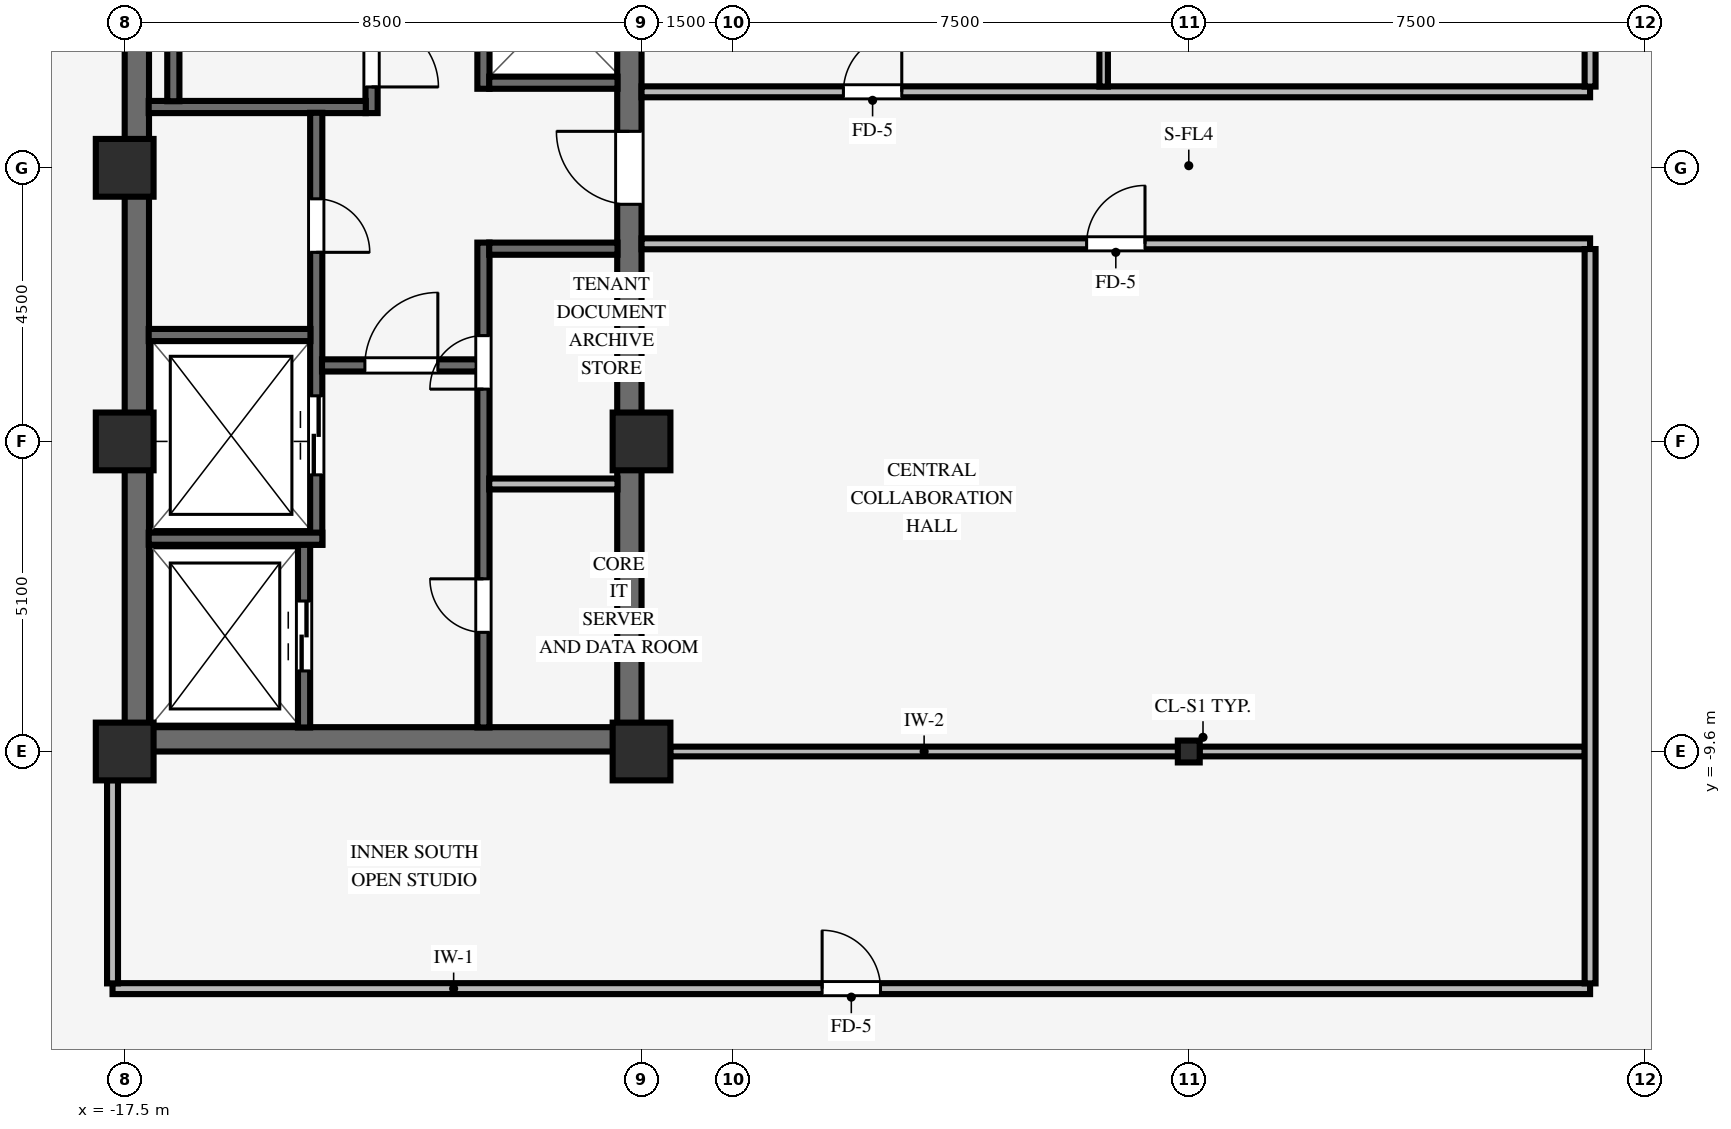
"""IFC4 building model, lengths in metres.
Left out: names, types, materials, properties, quantities, classifications, styles, units other than length and angle.
Written with IfcOpenShell. Run it as: python <this file> out.ifc"""

import sys

from ifc_helpers import new_model, si_unit, direction, frame, frame_2d, origin, origin_2d, place, context, subcontext, project, spatial, rectangle, i_section, extrude, source, transform, mapped, element, fill, save


model = new_model("IFC4")
c1 = context("Model", 3, precision=1e-05, world=origin(), true_north=direction((0.0, 1.0)))
c2 = subcontext(c1, "Body", "Model", "MODEL_VIEW")
j1 = project(units=[si_unit("LENGTHUNIT", "METRE"), si_unit("PLANEANGLEUNIT", "RADIAN")], contexts=[c1])
p1 = place(None, origin())
s1 = spatial("IfcSite", under=j1, at=p1, CompositionType="ELEMENT")
p2 = place(p1, origin())
s2 = spatial("IfcBuilding", under=s1, at=p2, CompositionType="ELEMENT")
p3 = place(p2, frame((0.0, 0.0, 164.0)))
s3 = spatial("IfcBuildingStorey", under=s2, at=p3, CompositionType="ELEMENT", Elevation=164.0)
p4 = place(p3, frame((-17.5, -9.4, 0.0), z_axis=(0.0, 0.0, 1.0), x_axis=(1.0, 0.0, 0.0)))
e1 = element("IfcWall", 1, at=p4, inside=s3, PredefinedType="SHEAR", context=c2, shape_type="SweptSolid", body=[
    extrude(rectangle(XDim=8.5, YDim=0.4, at=frame_2d((4.25, 0.0))), origin(), (0.0, 0.0, 1.0), 3.25),
])
p5 = place(p3, frame((-17.3, -9.205, 0.0), z_axis=(0.0, 0.0, 1.0), x_axis=(0.0, 1.0, 0.0)))
e2 = element("IfcWall", 2, at=p5, inside=s3, PredefinedType="SHEAR", context=c2, shape_type="SweptSolid", body=[
    extrude(rectangle(XDim=18.41, YDim=0.4, at=frame_2d((9.205, 0.0))), origin(), (0.0, 0.0, 1.0), 3.25),
])
p6 = place(p3, frame((-9.2, -9.205, 0.0), z_axis=(0.0, 0.0, 1.0), x_axis=(0.0, 1.0, 0.0)))
e3 = element("IfcWall", 3, at=p6, inside=s3, PredefinedType="SHEAR", context=c2, shape_type="SweptSolid", body=[
    extrude(rectangle(XDim=18.41, YDim=0.4, at=frame_2d((9.205, 0.0))), origin(), (0.0, 0.0, 1.0), 3.25),
])
p7 = place(p6, frame((8.605, 0.0, 0.0)))
e4 = element("IfcOpeningElement", 4, at=p7, cuts=e3, PredefinedType="OPENING", context=c2, shape_type="SweptSolid", body=[
    extrude(rectangle(XDim=1.2, YDim=2.15, at=frame_2d((0.6, 1.075))), frame((0.0, 0.21, 0.0), z_axis=(0.0, -1.0, 0.0), x_axis=(1.0, 0.0, 0.0)), (0.0, 0.0, 1.0), 0.42),
])
for number, where, z_axis, x_axis in (
    (5, (-17.5, -9.6, 0.0), (0.0, 0.0, 1.0), (1.0, 0.0, 0.0)),
    (6, (-17.5, -4.5, 0.0), (0.0, 0.0, 1.0), (1.0, 0.0, 0.0)),
    (7, (-9.0, -9.6, 0.0), (0.0, 0.0, 1.0), (1.0, 0.0, 0.0)),
    (8, (-9.0, -4.5, 0.0), (0.0, 0.0, 1.0), (1.0, 0.0, 0.0)),
    (9, (-17.5, 0.0, 0.0), (0.0, 0.0, 1.0), (1.0, 0.0, 0.0)),
):
    element("IfcColumn", number, at=place(p3, frame(where, z_axis=z_axis, x_axis=x_axis)), inside=s3, PredefinedType="COLUMN", context=c2, shape_type="SweptSolid", body=[
        extrude(rectangle(XDim=0.95, YDim=0.95, at=origin_2d()), origin(), (0.0, 0.0, 1.0), 3.25),
    ])
p8 = place(p3, frame((0.0, -9.6, 0.0), z_axis=(0.0, 0.0, 1.0), x_axis=(1.0, 0.0, 0.0)))
e10 = element("IfcColumn", 10, at=p8, inside=s3, PredefinedType="COLUMN", context=c2, shape_type="SweptSolid", body=[
    extrude(i_section(OverallWidth=0.36, OverallDepth=0.36, WebThickness=0.021, FlangeThickness=0.021, FilletRadius=0.018, at=origin_2d()), origin(), (0.0, 0.0, 1.0), 3.25),
])
p9 = place(p3, frame((-13.44, 0.9, 0.0), z_axis=(0.0, 0.0, 1.0), x_axis=(0.0, 1.0, 0.0)))
e11 = element("IfcWall", 11, at=p9, inside=s3, PredefinedType="SHEAR", context=c2, shape_type="SweptSolid", body=[
    extrude(rectangle(XDim=8.305, YDim=0.2, at=frame_2d((4.153, 0.0))), origin(), (0.0, 0.0, 1.0), 3.25),
])
p10 = place(p9, frame((1.53, 0.0, 0.0), z_axis=(0.0, 0.0, 1.0), x_axis=(-1.0, 0.0, 0.0)))
e12 = element("IfcOpeningElement", 12, at=p10, cuts=e11, PredefinedType="OPENING", context=c2, shape_type="SweptSolid", body=[
    extrude(rectangle(XDim=1.1, YDim=2.15, at=frame_2d((0.55, 1.075))), frame((0.0, 0.11, 0.0), z_axis=(0.0, -1.0, 0.0), x_axis=(1.0, 0.0, 0.0)), (0.0, 0.0, 1.0), 0.22),
])
p11 = place(p3, frame((-17.105, 1.0, 0.0), z_axis=(0.0, 0.0, 1.0), x_axis=(1.0, 0.0, 0.0)))
e13 = element("IfcWall", 13, at=p11, inside=s3, PredefinedType="SHEAR", context=c2, shape_type="SweptSolid", body=[
    extrude(rectangle(XDim=3.57, YDim=0.2, at=frame_2d((1.785, 0.0))), origin(), (0.0, 0.0, 1.0), 3.25),
])
p12 = place(p3, frame((-16.7, 1.095, 0.0), z_axis=(0.0, 0.0, 1.0), x_axis=(0.0, 1.0, 0.0)))
e14 = element("IfcWall", 14, at=p12, inside=s3, PredefinedType="SHEAR", context=c2, shape_type="SweptSolid", body=[
    extrude(rectangle(XDim=8.11, YDim=0.2, at=frame_2d((4.055, 0.0))), origin(), (0.0, 0.0, 1.0), 3.25),
])
p13 = place(p3, frame((-14.55, -9.205, 0.0), z_axis=(0.0, 0.0, 1.0), x_axis=(0.0, 1.0, 0.0)))
e15 = element("IfcWall", 15, at=p13, inside=s3, PredefinedType="SHEAR", context=c2, shape_type="SweptSolid", body=[
    extrude(rectangle(XDim=3.01, YDim=0.2, at=frame_2d((1.505, 0.0))), origin(), (0.0, 0.0, 1.0), 3.25),
])
p14 = place(p13, frame((0.93, 0.0, 0.0)))
e16 = element("IfcOpeningElement", 16, at=p14, cuts=e15, PredefinedType="OPENING", context=c2, shape_type="SweptSolid", body=[
    extrude(rectangle(XDim=1.15, YDim=2.15, at=frame_2d((0.575, 1.075))), frame((0.0, 0.11, 0.0), z_axis=(0.0, -1.0, 0.0), x_axis=(1.0, 0.0, 0.0)), (0.0, 0.0, 1.0), 0.22),
])
p15 = place(p3, frame((-14.35, -6.2, 0.0), z_axis=(0.0, 0.0, 1.0), x_axis=(0.0, 1.0, 0.0)))
e17 = element("IfcWall", 17, at=p15, inside=s3, PredefinedType="SHEAR", context=c2, shape_type="SweptSolid", body=[
    extrude(rectangle(XDim=7.105, YDim=0.2, at=frame_2d((3.552, 0.0))), origin(), (0.0, 0.0, 1.0), 3.25),
])
p16 = place(p15, frame((5.69, 0.0, 0.0), z_axis=(0.0, 0.0, 1.0), x_axis=(-1.0, 0.0, 0.0)))
e18 = element("IfcOpeningElement", 18, at=p16, cuts=e17, PredefinedType="OPENING", context=c2, shape_type="SweptSolid", body=[
    extrude(rectangle(XDim=0.88, YDim=2.1, at=frame_2d((0.44, 1.05))), frame((0.0, 0.11, 0.0), z_axis=(0.0, -1.0, 0.0), x_axis=(1.0, 0.0, 0.0)), (0.0, 0.0, 1.0), 0.22),
])
p17 = place(p15, frame((1.15, 0.0, 0.0)))
e19 = element("IfcOpeningElement", 19, at=p17, cuts=e17, PredefinedType="OPENING", context=c2, shape_type="SweptSolid", body=[
    extrude(rectangle(XDim=1.3, YDim=2.2, at=frame_2d((0.65, 1.1))), frame((0.0, 0.11, 0.0), z_axis=(0.0, -1.0, 0.0), x_axis=(1.0, 0.0, 0.0)), (0.0, 0.0, 1.0), 0.22),
])
p18 = place(p3, frame((-17.105, -6.1, 0.0), z_axis=(0.0, 0.0, 1.0), x_axis=(1.0, 0.0, 0.0)))
e20 = element("IfcWall", 20, at=p18, inside=s3, PredefinedType="SHEAR", context=c2, shape_type="SweptSolid", body=[
    extrude(rectangle(XDim=2.855, YDim=0.2, at=frame_2d((1.427, 0.0))), origin(), (0.0, 0.0, 1.0), 3.25),
])
p19 = place(p3, frame((-17.105, -2.75, 0.0), z_axis=(0.0, 0.0, 1.0), x_axis=(1.0, 0.0, 0.0)))
e21 = element("IfcWall", 21, at=p19, inside=s3, PredefinedType="SHEAR", context=c2, shape_type="SweptSolid", body=[
    extrude(rectangle(XDim=2.66, YDim=0.2, at=frame_2d((1.33, 0.0))), origin(), (0.0, 0.0, 1.0), 3.25),
])
p20 = place(p3, frame((-11.6, -9.205, 0.0), z_axis=(0.0, 0.0, 1.0), x_axis=(0.0, 1.0, 0.0)))
e22 = element("IfcWall", 22, at=p20, inside=s3, PredefinedType="SHEAR", context=c2, shape_type="SweptSolid", body=[
    extrude(rectangle(XDim=7.975, YDim=0.2, at=frame_2d((3.988, 0.0))), origin(), (0.0, 0.0, 1.0), 3.25),
])
p21 = place(p20, frame((1.565, 0.0, 0.0)))
e23 = element("IfcOpeningElement", 23, at=p21, cuts=e22, PredefinedType="OPENING", context=c2, shape_type="SweptSolid", body=[
    extrude(rectangle(XDim=0.88, YDim=2.1, at=frame_2d((0.44, 1.05))), frame((0.0, 0.11, 0.0), z_axis=(0.0, -1.0, 0.0), x_axis=(1.0, 0.0, 0.0)), (0.0, 0.0, 1.0), 0.22),
])
p22 = place(p20, frame((5.565, 0.0, 0.0)))
e24 = element("IfcOpeningElement", 24, at=p22, cuts=e22, PredefinedType="OPENING", context=c2, shape_type="SweptSolid", body=[
    extrude(rectangle(XDim=0.88, YDim=2.1, at=frame_2d((0.44, 1.05))), frame((0.0, 0.11, 0.0), z_axis=(0.0, -1.0, 0.0), x_axis=(1.0, 0.0, 0.0)), (0.0, 0.0, 1.0), 0.22),
])
p23 = place(p3, frame((-14.255, -3.25, 0.0), z_axis=(0.0, 0.0, 1.0), x_axis=(1.0, 0.0, 0.0)))
e25 = element("IfcWall", 25, at=p23, inside=s3, PredefinedType="SHEAR", context=c2, shape_type="SweptSolid", body=[
    extrude(rectangle(XDim=2.56, YDim=0.2, at=frame_2d((1.28, 0.0))), origin(), (0.0, 0.0, 1.0), 3.25),
])
p24 = place(p23, frame((0.705, 0.0, 0.0)))
e26 = element("IfcOpeningElement", 26, at=p24, cuts=e25, PredefinedType="OPENING", context=c2, shape_type="SweptSolid", body=[
    extrude(rectangle(XDim=1.2, YDim=2.15, at=frame_2d((0.6, 1.075))), frame((0.0, 0.11, 0.0), z_axis=(0.0, -1.0, 0.0), x_axis=(1.0, 0.0, 0.0)), (0.0, 0.0, 1.0), 0.22),
])
p25 = place(p3, frame((-11.505, -1.33, 0.0), z_axis=(0.0, 0.0, 1.0), x_axis=(1.0, 0.0, 0.0)))
e27 = element("IfcWall", 27, at=p25, inside=s3, PredefinedType="SHEAR", context=c2, shape_type="SweptSolid", body=[
    extrude(rectangle(XDim=2.11, YDim=0.2, at=frame_2d((1.055, 0.0))), origin(), (0.0, 0.0, 1.0), 3.25),
])
p26 = place(p3, frame((-11.505, -5.2, 0.0), z_axis=(0.0, 0.0, 1.0), x_axis=(1.0, 0.0, 0.0)))
e28 = element("IfcWall", 28, at=p26, inside=s3, PredefinedType="PARTITIONING", context=c2, shape_type="SweptSolid", body=[
    extrude(rectangle(XDim=2.11, YDim=0.18, at=frame_2d((1.055, 0.0))), origin(), (0.0, 0.0, 1.0), 3.24),
])
p27 = place(p3, frame((-11.6, 1.3, 0.0), z_axis=(0.0, 0.0, 1.0), x_axis=(0.0, 1.0, 0.0)))
e29 = element("IfcWall", 29, at=p27, inside=s3, PredefinedType="SHEAR", context=c2, shape_type="SweptSolid", body=[
    extrude(rectangle(XDim=7.905, YDim=0.2, at=frame_2d((3.953, 0.0))), origin(), (0.0, 0.0, 1.0), 3.25),
])
p28 = place(p3, frame((-11.505, 1.4, 0.0), z_axis=(0.0, 0.0, 1.0), x_axis=(1.0, 0.0, 0.0)))
e30 = element("IfcWall", 30, at=p28, inside=s3, PredefinedType="SHEAR", context=c2, shape_type="SweptSolid", body=[
    extrude(rectangle(XDim=2.11, YDim=0.2, at=frame_2d((1.055, 0.0))), origin(), (0.0, 0.0, 1.0), 3.25),
])
p29 = place(p3, frame((-17.7, -13.5, 0.0), z_axis=(0.0, 0.0, 1.0), x_axis=(1.0, 0.0, 0.0)))
e31 = element("IfcWall", 31, at=p29, inside=s3, PredefinedType="PARTITIONING", context=c2, shape_type="SweptSolid", body=[
    extrude(rectangle(XDim=24.3, YDim=0.18, at=frame_2d((12.15, 0.0))), origin(), (0.0, 0.0, 1.0), 2.888),
])
p30 = place(p29, frame((11.67, 0.0, 0.0)))
e32 = element("IfcOpeningElement", 32, at=p30, cuts=e31, PredefinedType="OPENING", context=c2, shape_type="SweptSolid", body=[
    extrude(rectangle(XDim=0.96, YDim=2.1, at=frame_2d((0.48, 1.05))), frame((0.0, 0.1, 0.0), z_axis=(0.0, -1.0, 0.0), x_axis=(1.0, 0.0, 0.0)), (0.0, 0.0, 1.0), 0.2),
])
p31 = place(p3, frame((-8.529, -9.6, 0.0), z_axis=(0.0, 0.0, 1.0), x_axis=(1.0, 0.0, 0.0)))
e33 = element("IfcWall", 33, at=p31, inside=s3, PredefinedType="PARTITIONING", context=c2, shape_type="SweptSolid", body=[
    extrude(rectangle(XDim=8.353, YDim=0.16, at=frame_2d((4.177, 0.0))), origin(), (0.0, 0.0, 1.0), 2.285),
])
p32 = place(p3, frame((0.176, -9.6, 0.0), z_axis=(0.0, 0.0, 1.0), x_axis=(1.0, 0.0, 0.0)))
e34 = element("IfcWall", 34, at=p32, inside=s3, PredefinedType="PARTITIONING", context=c2, shape_type="SweptSolid", body=[
    extrude(rectangle(XDim=6.338, YDim=0.16, at=frame_2d((3.169, 0.0))), origin(), (0.0, 0.0, 1.0), 2.285),
])
p33 = place(p3, frame((-9.0, -1.25, 0.0), z_axis=(0.0, 0.0, 1.0), x_axis=(1.0, 0.0, 0.0)))
e35 = element("IfcWall", 35, at=p33, inside=s3, PredefinedType="PARTITIONING", context=c2, shape_type="SweptSolid", body=[
    extrude(rectangle(XDim=15.6, YDim=0.18, at=frame_2d((7.8, 0.0))), origin(), (0.0, 0.0, 1.0), 3.24),
])
p34 = place(p33, frame((7.32, 0.0, 0.0)))
e36 = element("IfcOpeningElement", 36, at=p34, cuts=e35, PredefinedType="OPENING", context=c2, shape_type="SweptSolid", body=[
    extrude(rectangle(XDim=0.96, YDim=2.1, at=frame_2d((0.48, 1.05))), frame((0.0, 0.1, 0.0), z_axis=(0.0, -1.0, 0.0), x_axis=(1.0, 0.0, 0.0)), (0.0, 0.0, 1.0), 0.2),
])
p35 = place(p3, frame((-9.0, 1.25, 0.0), z_axis=(0.0, 0.0, 1.0), x_axis=(1.0, 0.0, 0.0)))
e37 = element("IfcWall", 37, at=p35, inside=s3, PredefinedType="PARTITIONING", context=c2, shape_type="SweptSolid", body=[
    extrude(rectangle(XDim=15.6, YDim=0.18, at=frame_2d((7.8, 0.0))), origin(), (0.0, 0.0, 1.0), 3.24),
])
p36 = place(p35, frame((3.32, 0.0, 0.0)))
e38 = element("IfcOpeningElement", 38, at=p36, cuts=e37, PredefinedType="OPENING", context=c2, shape_type="SweptSolid", body=[
    extrude(rectangle(XDim=0.96, YDim=2.1, at=frame_2d((0.48, 1.05))), frame((0.0, 0.1, 0.0), z_axis=(0.0, -1.0, 0.0), x_axis=(1.0, 0.0, 0.0)), (0.0, 0.0, 1.0), 0.2),
])
p37 = place(p3, frame((-17.7, -13.414, 0.0), z_axis=(0.0, 0.0, 1.0), x_axis=(0.0, 1.0, 0.0)))
e39 = element("IfcWall", 39, at=p37, inside=s3, PredefinedType="PARTITIONING", context=c2, shape_type="SweptSolid", body=[
    extrude(rectangle(XDim=3.343, YDim=0.18, at=frame_2d((1.671, 0.0))), origin(), (0.0, 0.0, 1.0), 2.696),
])
p38 = place(p3, frame((-1.4, 1.336, 0.0), z_axis=(0.0, 0.0, 1.0), x_axis=(0.0, 1.0, 0.0)))
e40 = element("IfcWall", 40, at=p38, inside=s3, PredefinedType="PARTITIONING", context=c2, shape_type="SweptSolid", body=[
    extrude(rectangle(XDim=8.188, YDim=0.14, at=frame_2d((4.094, 0.0))), origin(), (0.0, 0.0, 1.0), 3.24),
])
p39 = place(p3, frame((6.6, -13.414, 0.0), z_axis=(0.0, 0.0, 1.0), x_axis=(0.0, 1.0, 0.0)))
e41 = element("IfcWall", 41, at=p39, inside=s3, PredefinedType="PARTITIONING", context=c2, shape_type="SweptSolid", body=[
    extrude(rectangle(XDim=12.078, YDim=0.18, at=frame_2d((6.039, 0.0))), origin(), (0.0, 0.0, 1.0), 3.24),
])
p40 = place(p3, frame((6.6, 1.336, 0.0), z_axis=(0.0, 0.0, 1.0), x_axis=(0.0, 1.0, 0.0)))
e42 = element("IfcWall", 42, at=p40, inside=s3, PredefinedType="PARTITIONING", context=c2, shape_type="SweptSolid", body=[
    extrude(rectangle(XDim=12.078, YDim=0.18, at=frame_2d((6.039, 0.0))), origin(), (0.0, 0.0, 1.0), 3.24),
])
p41 = place(p40, frame((3.652, 0.0, 0.0)))
e43 = element("IfcOpeningElement", 43, at=p41, cuts=e42, PredefinedType="OPENING", context=c2, shape_type="SweptSolid", body=[
    extrude(rectangle(XDim=0.96, YDim=2.1, at=frame_2d((0.48, 1.05))), frame((0.0, 0.1, 0.0), z_axis=(0.0, -1.0, 0.0), x_axis=(1.0, 0.0, 0.0)), (0.0, 0.0, 1.0), 0.2),
])
m1 = source(origin(), c2, "Body", "SweptSolid", [
    extrude(rectangle(XDim=1.1, YDim=2.15, at=frame_2d((0.55, 1.075))), frame((0.0, 0.025, 0.0), z_axis=(0.0, -1.0, 0.0), x_axis=(1.0, 0.0, 0.0)), (0.0, 0.0, 1.0), 0.05),
])
p42 = place(p10, origin())
e44 = element("IfcDoor", 44, at=p42, inside=s3, OperationType="SINGLE_SWING_RIGHT", PredefinedType="DOOR", context=c2, shape_type="MappedRepresentation", body=[
    mapped(m1, transform((0.0, 0.0, 0.0), scale=1.0)),
])
fill(e12, e44)
m2 = source(origin(), c2, "Body", "SweptSolid", [
    extrude(rectangle(XDim=0.88, YDim=2.1, at=frame_2d((0.44, 1.05))), frame((0.0, 0.025, 0.0), z_axis=(0.0, -1.0, 0.0), x_axis=(1.0, 0.0, 0.0)), (0.0, 0.0, 1.0), 0.05),
])
p43 = place(p16, origin())
e45 = element("IfcDoor", 45, at=p43, inside=s3, OperationType="SINGLE_SWING_RIGHT", PredefinedType="DOOR", context=c2, shape_type="MappedRepresentation", body=[
    mapped(m2, transform((0.0, 0.0, 0.0), scale=1.0)),
])
fill(e18, e45)
m3 = source(origin(), c2, "Body", "SweptSolid", [
    extrude(rectangle(XDim=1.2, YDim=2.15, at=frame_2d((0.6, 1.075))), frame((0.0, 0.025, 0.0), z_axis=(0.0, -1.0, 0.0), x_axis=(1.0, 0.0, 0.0)), (0.0, 0.0, 1.0), 0.05),
])
p44 = place(p24, origin())
e46 = element("IfcDoor", 46, at=p44, inside=s3, OperationType="SINGLE_SWING_RIGHT", PredefinedType="DOOR", context=c2, shape_type="MappedRepresentation", body=[
    mapped(m3, transform((0.0, 0.0, 0.0), scale=1.0)),
])
fill(e26, e46)
p45 = place(p21, origin())
e47 = element("IfcDoor", 47, at=p45, inside=s3, OperationType="SINGLE_SWING_RIGHT", PredefinedType="DOOR", context=c2, shape_type="MappedRepresentation", body=[
    mapped(m2, transform((0.0, 0.0, 0.0), scale=1.0)),
])
fill(e23, e47)
p46 = place(p22, origin())
e48 = element("IfcDoor", 48, at=p46, inside=s3, OperationType="SINGLE_SWING_LEFT", PredefinedType="DOOR", context=c2, shape_type="MappedRepresentation", body=[
    mapped(m2, transform((0.0, 0.0, 0.0), scale=1.0)),
])
fill(e24, e48)
p47 = place(p7, origin())
e49 = element("IfcDoor", 49, at=p47, inside=s3, OperationType="SINGLE_SWING_RIGHT", PredefinedType="DOOR", context=c2, shape_type="MappedRepresentation", body=[
    mapped(m3, transform((0.0, 0.0, 0.0), scale=1.0)),
])
fill(e4, e49)
m4 = source(origin(), c2, "Body", "SweptSolid", [
    extrude(rectangle(XDim=1.15, YDim=2.15, at=frame_2d((0.575, 1.075))), frame((0.0, 0.025, 0.0), z_axis=(0.0, -1.0, 0.0), x_axis=(1.0, 0.0, 0.0)), (0.0, 0.0, 1.0), 0.05),
])
p48 = place(p14, origin())
e50 = element("IfcDoor", 50, at=p48, inside=s3, OperationType="DOUBLE_DOOR_SLIDING", PredefinedType="DOOR", context=c2, shape_type="MappedRepresentation", body=[
    mapped(m4, transform((0.0, 0.0, 0.0), scale=1.0)),
])
fill(e16, e50)
m5 = source(origin(), c2, "Body", "SweptSolid", [
    extrude(rectangle(XDim=1.3, YDim=2.2, at=frame_2d((0.65, 1.1))), frame((0.0, 0.025, 0.0), z_axis=(0.0, -1.0, 0.0), x_axis=(1.0, 0.0, 0.0)), (0.0, 0.0, 1.0), 0.05),
])
p49 = place(p17, origin())
e51 = element("IfcDoor", 51, at=p49, inside=s3, OperationType="DOUBLE_DOOR_SLIDING", PredefinedType="DOOR", context=c2, shape_type="MappedRepresentation", body=[
    mapped(m5, transform((0.0, 0.0, 0.0), scale=1.0)),
])
fill(e19, e51)
m6 = source(origin(), c2, "Body", "SweptSolid", [
    extrude(rectangle(XDim=0.96, YDim=2.1, at=frame_2d((0.48, 1.05))), frame((0.0, 0.025, 0.0), z_axis=(0.0, -1.0, 0.0), x_axis=(1.0, 0.0, 0.0)), (0.0, 0.0, 1.0), 0.05),
])
p50 = place(p30, origin())
e52 = element("IfcDoor", 52, at=p50, inside=s3, OperationType="SINGLE_SWING_LEFT", PredefinedType="DOOR", context=c2, shape_type="MappedRepresentation", body=[
    mapped(m6, transform((0.0, 0.0, 0.0), scale=1.0)),
])
fill(e32, e52)
p51 = place(p34, origin())
e53 = element("IfcDoor", 53, at=p51, inside=s3, OperationType="SINGLE_SWING_RIGHT", PredefinedType="DOOR", context=c2, shape_type="MappedRepresentation", body=[
    mapped(m6, transform((0.0, 0.0, 0.0), scale=1.0)),
])
fill(e36, e53)
p52 = place(p36, origin())
e54 = element("IfcDoor", 54, at=p52, inside=s3, OperationType="SINGLE_SWING_RIGHT", PredefinedType="DOOR", context=c2, shape_type="MappedRepresentation", body=[
    mapped(m6, transform((0.0, 0.0, 0.0), scale=1.0)),
])
fill(e38, e54)
save(model, sys.argv[1])
